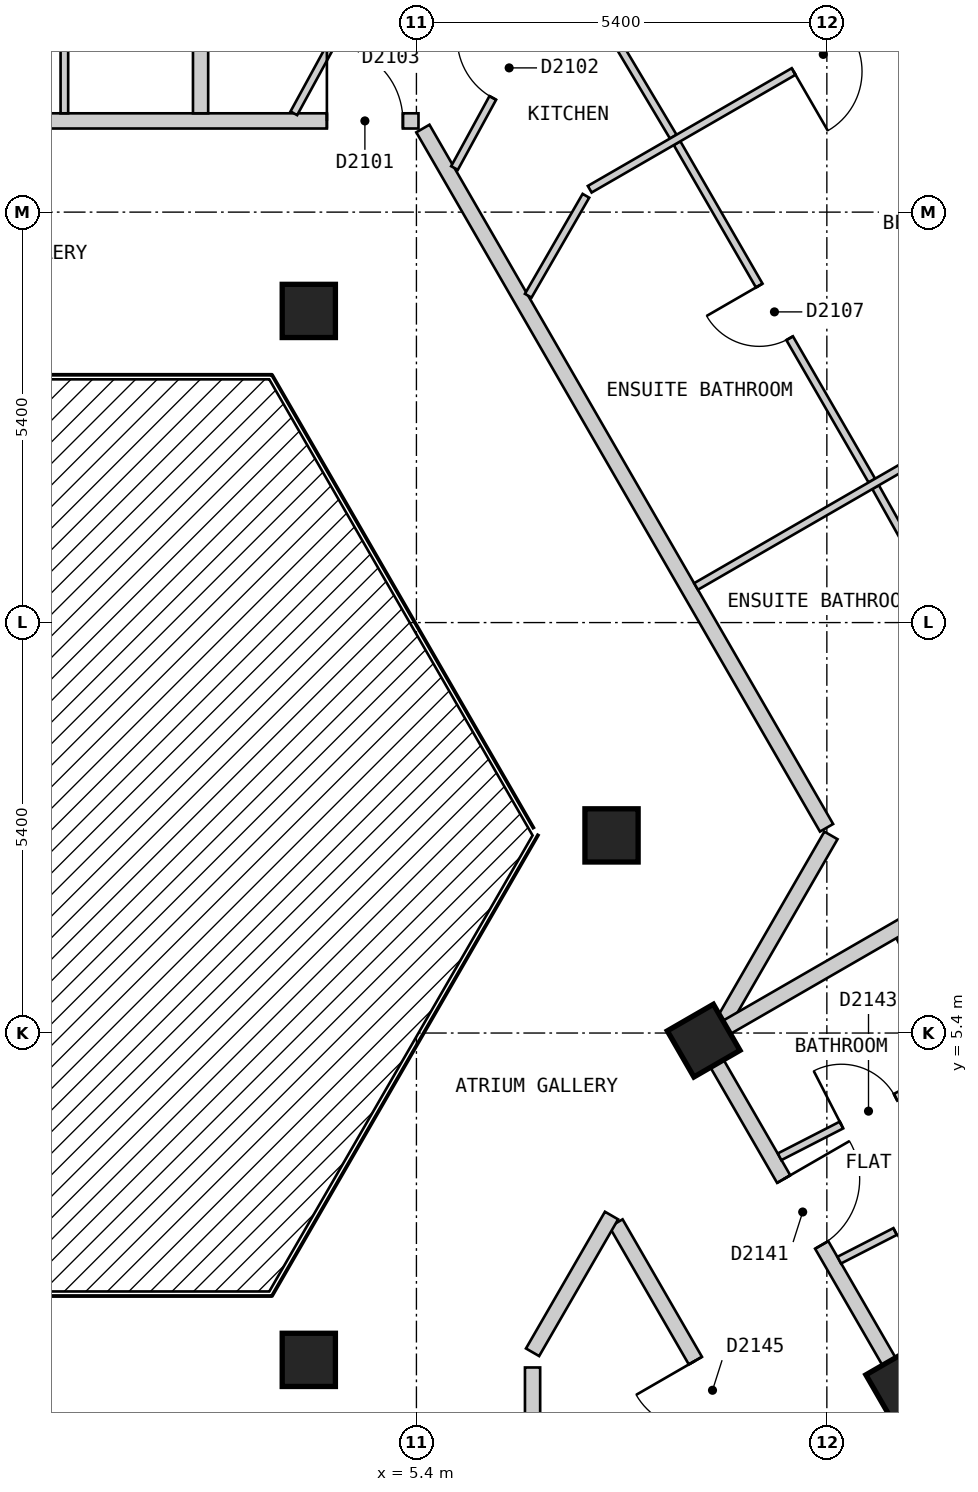
"""IFC4 building model, lengths in metres.
Left out: names, types, materials, properties, quantities, classifications, styles, units other than length and angle.
Written with IfcOpenShell. Run it as: python <this file> out.ifc"""

import sys

from ifc_helpers import new_model, si_unit, direction, frame, frame_2d, origin, origin_2d, place, context, subcontext, project, spatial, rectangle, extrude, element, fill, save


model = new_model("IFC4")
c1 = context("Model", 3, precision=1e-05, world=origin(), true_north=direction((0.0, 1.0)))
c2 = subcontext(c1, "Body", "Model", "MODEL_VIEW")
j1 = project(units=[si_unit("LENGTHUNIT", "METRE"), si_unit("PLANEANGLEUNIT", "RADIAN")], contexts=[c1])
p1 = place(None, origin())
s1 = spatial("IfcSite", under=j1, at=p1, CompositionType="ELEMENT")
p2 = place(p1, origin())
s2 = spatial("IfcBuilding", under=s1, at=p2, CompositionType="ELEMENT")
p3 = place(p2, frame((0.0, 0.0, 217.8)))
s3 = spatial("IfcBuildingStorey", under=s2, at=p3, CompositionType="ELEMENT", Elevation=217.8)
for number, where, z_axis, x_axis in (
    (1, (11.792, 0.775, 0.0), (0.0, 0.0, 1.0), (-0.5, 0.866, 0.0)),
    (2, (3.984, 1.1, 0.0), (0.0, 0.0, 1.0), (1.0, 0.0, 0.0)),
    (3, (9.179, 5.3, 0.0), (0.0, 0.0, 1.0), (-0.5, 0.866, 0.0)),
    (4, (7.967, 8.0, 0.0), (0.0, 0.0, 1.0), (1.0, 0.0, 0.0)),
    (5, (3.984, 14.9, 0.0), (0.0, 0.0, 1.0), (1.0, 0.0, 0.0)),
):
    element("IfcColumn", number, at=place(p3, frame(where, z_axis=z_axis, x_axis=x_axis)), inside=s3, PredefinedType="COLUMN", context=c2, shape_type="SweptSolid", body=[
        extrude(rectangle(XDim=0.7, YDim=0.7, at=origin_2d()), origin(), (0.0, 0.0, 1.0), 3.0),
    ])
p4 = place(p3, frame((8.026, 2.899, 0.0), z_axis=(0.0, 0.0, 1.0), x_axis=(0.499986018985, -0.866033475577, 0.0)))
e6 = element("IfcWall", 6, at=p4, inside=s3, PredefinedType="PARTITIONING", context=c2, shape_type="SweptSolid", body=[
    extrude(rectangle(XDim=5.078, YDim=0.2, at=frame_2d((2.539, 0.0))), origin(), (0.0, 0.0, 1.0), 2.7),
])
p5 = place(p4, frame((2.089, 0.0, 0.0)))
e7 = element("IfcOpeningElement", 7, at=p5, cuts=e6, PredefinedType="OPENING", context=c2, shape_type="SweptSolid", body=[
    extrude(rectangle(XDim=0.9, YDim=2.1, at=frame_2d((0.45, 1.05))), frame((0.0, 0.11, 0.0), z_axis=(0.0, -1.0, 0.0), x_axis=(1.0, 0.0, 0.0)), (0.0, 0.0, 1.0), 0.22),
])
p6 = place(p3, frame((9.238, 5.2, 0.0), z_axis=(0.0, 0.0, 1.0), x_axis=(0.500025705601, -0.86601056214, 0.0)))
e8 = element("IfcWall", 8, at=p6, inside=s3, PredefinedType="PARTITIONING", context=c2, shape_type="SweptSolid", body=[
    extrude(rectangle(XDim=7.735, YDim=0.2, at=frame_2d((3.868, 0.0))), origin(), (0.0, 0.0, 1.0), 2.7),
])
p7 = place(p6, frame((6.705, 0.0, 0.0)))
e9 = element("IfcOpeningElement", 9, at=p7, cuts=e8, PredefinedType="OPENING", context=c2, shape_type="SweptSolid", body=[
    extrude(rectangle(XDim=1.0, YDim=2.1, at=frame_2d((0.5, 1.05))), frame((0.0, 0.11, 0.0), z_axis=(0.0, -1.0, 0.0), x_axis=(1.0, 0.0, 0.0)), (0.0, 0.0, 1.0), 0.22),
])
p8 = place(p6, frame((1.988, 0.0, 0.0)))
e10 = element("IfcOpeningElement", 10, at=p8, cuts=e8, PredefinedType="OPENING", context=c2, shape_type="SweptSolid", body=[
    extrude(rectangle(XDim=1.0, YDim=2.1, at=frame_2d((0.5, 1.05))), frame((0.0, 0.11, 0.0), z_axis=(0.0, -1.0, 0.0), x_axis=(1.0, 0.0, 0.0)), (0.0, 0.0, 1.0), 0.22),
])
p9 = place(p3, frame((5.485, 17.3, 0.0), z_axis=(0.0, 0.0, 1.0), x_axis=(0.499943285704, -0.866058145322, 0.0)))
e11 = element("IfcWall", 11, at=p9, inside=s3, PredefinedType="PARTITIONING", context=c2, shape_type="SweptSolid", body=[
    extrude(rectangle(XDim=10.623, YDim=0.2, at=frame_2d((5.312, 0.0))), origin(), (0.0, 0.0, 1.0), 2.7),
])
p10 = place(p3, frame((6.928, 1.0, 0.0), z_axis=(0.0, 0.0, 1.0), x_axis=(0.0, -1.0, 0.0)))
e12 = element("IfcWall", 12, at=p10, inside=s3, PredefinedType="PARTITIONING", context=c2, shape_type="SweptSolid", body=[
    extrude(rectangle(XDim=3.699, YDim=0.2, at=frame_2d((1.85, 0.0))), origin(), (0.0, 0.0, 1.0), 2.7),
])
p11 = place(p3, frame((-5.312, 17.4, 0.0), z_axis=(0.0, 0.0, 1.0), x_axis=(1.0, 0.0, 0.0)))
e13 = element("IfcWall", 13, at=p11, inside=s3, PredefinedType="PARTITIONING", context=c2, shape_type="SweptSolid", body=[
    extrude(rectangle(XDim=10.739, YDim=0.2, at=frame_2d((5.37, 0.0))), origin(), (0.0, 0.0, 1.0), 2.7),
])
p12 = place(p11, frame((9.534, 0.0, 0.0)))
e14 = element("IfcOpeningElement", 14, at=p12, cuts=e13, PredefinedType="OPENING", context=c2, shape_type="SweptSolid", body=[
    extrude(rectangle(XDim=1.0, YDim=2.1, at=frame_2d((0.5, 1.05))), frame((0.0, 0.11, 0.0), z_axis=(0.0, -1.0, 0.0), x_axis=(1.0, 0.0, 0.0)), (0.0, 0.0, 1.0), 0.22),
])
p13 = place(p11, frame((4.812, 0.0, 0.0)))
e15 = element("IfcOpeningElement", 15, at=p13, cuts=e13, PredefinedType="OPENING", context=c2, shape_type="SweptSolid", body=[
    extrude(rectangle(XDim=1.0, YDim=2.1, at=frame_2d((0.5, 1.05))), frame((0.0, 0.11, 0.0), z_axis=(0.0, -1.0, 0.0), x_axis=(1.0, 0.0, 0.0)), (0.0, 0.0, 1.0), 0.22),
])
p14 = place(p3, frame((6.928, 1.2, 0.0), z_axis=(0.0, 0.0, 1.0), x_axis=(0.500132712588, 0.865948768577, 0.0)))
e16 = element("IfcWall", 16, at=p14, inside=s3, PredefinedType="PARTITIONING", context=c2, shape_type="SweptSolid", body=[
    extrude(rectangle(XDim=2.078, YDim=0.2, at=frame_2d((1.039, 0.0))), origin(), (0.0, 0.0, 1.0), 2.7),
])
p15 = place(p3, frame((9.454, 5.574, 0.0), z_axis=(0.0, 0.0, 1.0), x_axis=(0.499795394297, 0.86614350072, 0.0)))
e17 = element("IfcWall", 17, at=p15, inside=s3, PredefinedType="PARTITIONING", context=c2, shape_type="SweptSolid", body=[
    extrude(rectangle(XDim=2.801, YDim=0.2, at=frame_2d((1.4, 0.0))), origin(), (0.0, 0.0, 1.0), 2.7),
])
p16 = place(p3, frame((7.414, 19.484, 0.0), z_axis=(0.0, 0.0, 1.0), x_axis=(0.511881371655, -0.859056145634, 0.0)))
e18 = element("IfcWall", 18, at=p16, inside=s3, PredefinedType="PARTITIONING", context=c2, shape_type="SweptSolid", body=[
    extrude(rectangle(XDim=2.667, YDim=0.1, at=frame_2d((1.333, 0.0))), origin(), (0.0, 0.0, 1.0), 2.7),
])
p17 = place(p3, frame((8.829, 17.107, 0.0), z_axis=(0.0, 0.0, 1.0), x_axis=(0.500022055211, -0.866012669828, 0.0)))
e19 = element("IfcWall", 19, at=p17, inside=s3, PredefinedType="PARTITIONING", context=c2, shape_type="SweptSolid", body=[
    extrude(rectangle(XDim=5.126, YDim=0.1, at=frame_2d((2.563, 0.0))), origin(), (0.0, 0.0, 1.0), 2.7),
])
p18 = place(p17, frame((2.163, 0.0, 0.0)))
e20 = element("IfcOpeningElement", 20, at=p18, cuts=e19, PredefinedType="OPENING", context=c2, shape_type="SweptSolid", body=[
    extrude(rectangle(XDim=0.8, YDim=2.1, at=frame_2d((0.4, 1.05))), frame((0.0, 0.06, 0.0), z_axis=(0.0, -1.0, 0.0), x_axis=(1.0, 0.0, 0.0)), (0.0, 0.0, 1.0), 0.12),
])
p19 = place(p3, frame((11.441, 12.582, 0.0), z_axis=(0.0, 0.0, 1.0), x_axis=(0.488568218554, -0.872525699231, 0.0)))
e21 = element("IfcWall", 21, at=p19, inside=s3, PredefinedType="PARTITIONING", context=c2, shape_type="SweptSolid", body=[
    extrude(rectangle(XDim=5.076, YDim=0.1, at=frame_2d((2.538, 0.0))), origin(), (0.0, 0.0, 1.0), 2.7),
])
p20 = place(p19, frame((2.163, 0.0, 0.0)))
e22 = element("IfcOpeningElement", 22, at=p20, cuts=e21, PredefinedType="OPENING", context=c2, shape_type="SweptSolid", body=[
    extrude(rectangle(XDim=0.8, YDim=2.1, at=frame_2d((0.4, 1.05))), frame((0.0, 0.06, 0.0), z_axis=(0.0, -1.0, 0.0), x_axis=(1.0, 0.0, 0.0)), (0.0, 0.0, 1.0), 0.12),
])
p21 = place(p3, frame((11.772, 6.646, 0.0), z_axis=(0.0, 0.0, 1.0), x_axis=(0.456175983405, -0.889889584254, 0.0)))
e23 = element("IfcWall", 23, at=p21, inside=s3, PredefinedType="PARTITIONING", context=c2, shape_type="SweptSolid", body=[
    extrude(rectangle(XDim=3.348, YDim=0.1, at=frame_2d((1.674, 0.0))), origin(), (0.0, 0.0, 1.0), 2.7),
])
p22 = place(p3, frame((6.871, 15.1, 0.0), z_axis=(0.0, 0.0, 1.0), x_axis=(0.499805980977, 0.866137391745, 0.0)))
e24 = element("IfcWall", 24, at=p22, inside=s3, PredefinedType="PARTITIONING", context=c2, shape_type="SweptSolid", body=[
    extrude(rectangle(XDim=1.518, YDim=0.1, at=frame_2d((0.759, 0.0))), origin(), (0.0, 0.0, 1.0), 2.7),
])
p23 = place(p3, frame((3.787, 17.5, 0.0), z_axis=(0.0, 0.0, 1.0), x_axis=(0.479146828267, 0.877734764585, 0.0)))
e25 = element("IfcWall", 25, at=p23, inside=s3, PredefinedType="PARTITIONING", context=c2, shape_type="SweptSolid", body=[
    extrude(rectangle(XDim=3.076, YDim=0.1, at=frame_2d((1.538, 0.0))), origin(), (0.0, 0.0, 1.0), 2.7),
])
p24 = place(p23, frame((1.081, 0.0, 0.0)))
e26 = element("IfcOpeningElement", 26, at=p24, cuts=e25, PredefinedType="OPENING", context=c2, shape_type="SweptSolid", body=[
    extrude(rectangle(XDim=0.8, YDim=2.1, at=frame_2d((0.4, 1.05))), frame((0.0, 0.06, 0.0), z_axis=(0.0, -1.0, 0.0), x_axis=(1.0, 0.0, 0.0)), (0.0, 0.0, 1.0), 0.12),
])
p25 = place(p3, frame((5.901, 16.78, 0.0), z_axis=(0.0, 0.0, 1.0), x_axis=(0.479148317257, 0.877733951759, 0.0)))
e27 = element("IfcWall", 27, at=p25, inside=s3, PredefinedType="PARTITIONING", context=c2, shape_type="SweptSolid", body=[
    extrude(rectangle(XDim=3.118, YDim=0.1, at=frame_2d((1.559, 0.0))), origin(), (0.0, 0.0, 1.0), 2.7),
])
p26 = place(p25, frame((1.051, 0.0, 0.0)))
e28 = element("IfcOpeningElement", 28, at=p26, cuts=e27, PredefinedType="OPENING", context=c2, shape_type="SweptSolid", body=[
    extrude(rectangle(XDim=0.9, YDim=2.1, at=frame_2d((0.45, 1.05))), frame((0.0, 0.06, 0.0), z_axis=(0.0, -1.0, 0.0), x_axis=(1.0, 0.0, 0.0)), (0.0, 0.0, 1.0), 0.12),
])
p27 = place(p3, frame((0.768, 17.5, 0.0), z_axis=(0.0, 0.0, 1.0), x_axis=(0.0, 1.0, 0.0)))
e29 = element("IfcWall", 29, at=p27, inside=s3, PredefinedType="PARTITIONING", context=c2, shape_type="SweptSolid", body=[
    extrude(rectangle(XDim=2.51, YDim=0.1, at=frame_2d((1.255, 0.0))), origin(), (0.0, 0.0, 1.0), 2.7),
])
p28 = place(p27, frame((0.83, 0.0, 0.0)))
e30 = element("IfcOpeningElement", 30, at=p28, cuts=e29, PredefinedType="OPENING", context=c2, shape_type="SweptSolid", body=[
    extrude(rectangle(XDim=0.8, YDim=2.1, at=frame_2d((0.4, 1.05))), frame((0.0, 0.06, 0.0), z_axis=(0.0, -1.0, 0.0), x_axis=(1.0, 0.0, 0.0)), (0.0, 0.0, 1.0), 0.12),
])
p29 = place(p3, frame((10.178, 3.772, 0.0), z_axis=(0.0, 0.0, 1.0), x_axis=(0.889732071959, 0.456483121405, 0.0)))
e31 = element("IfcWall", 31, at=p29, inside=s3, PredefinedType="PARTITIONING", context=c2, shape_type="SweptSolid", body=[
    extrude(rectangle(XDim=2.679, YDim=0.1, at=frame_2d((1.34, 0.0))), origin(), (0.0, 0.0, 1.0), 2.7),
])
p30 = place(p29, frame((0.915, 0.0, 0.0)))
e32 = element("IfcOpeningElement", 32, at=p30, cuts=e31, PredefinedType="OPENING", context=c2, shape_type="SweptSolid", body=[
    extrude(rectangle(XDim=0.8, YDim=2.1, at=frame_2d((0.4, 1.05))), frame((0.0, 0.06, 0.0), z_axis=(0.0, -1.0, 0.0), x_axis=(1.0, 0.0, 0.0)), (0.0, 0.0, 1.0), 0.12),
])
p31 = place(p3, frame((10.963, 2.412, 0.0), z_axis=(0.0, 0.0, 1.0), x_axis=(0.889943997558, 0.456069820543, 0.0)))
e33 = element("IfcWall", 33, at=p31, inside=s3, PredefinedType="PARTITIONING", context=c2, shape_type="SweptSolid", body=[
    extrude(rectangle(XDim=2.651, YDim=0.1, at=frame_2d((1.325, 0.0))), origin(), (0.0, 0.0, 1.0), 2.7),
])
p32 = place(p31, frame((0.826, 0.0, 0.0)))
e34 = element("IfcOpeningElement", 34, at=p32, cuts=e33, PredefinedType="OPENING", context=c2, shape_type="SweptSolid", body=[
    extrude(rectangle(XDim=0.9, YDim=2.1, at=frame_2d((0.45, 1.05))), frame((0.0, 0.06, 0.0), z_axis=(0.0, -1.0, 0.0), x_axis=(1.0, 0.0, 0.0)), (0.0, 0.0, 1.0), 0.12),
])
p33 = place(p3, frame((9.079, 11.275, 0.0), z_axis=(0.0, 0.0, 1.0), x_axis=(0.866001485781, 0.500041424909, 0.0)))
e35 = element("IfcWall", 35, at=p33, inside=s3, PredefinedType="PARTITIONING", context=c2, shape_type="SweptSolid", body=[
    extrude(rectangle(XDim=7.2, YDim=0.1, at=frame_2d((3.6, 0.0))), origin(), (0.0, 0.0, 1.0), 2.7),
])
p34 = place(p33, frame((4.5, 0.0, 0.0)))
e36 = element("IfcOpeningElement", 36, at=p34, cuts=e35, PredefinedType="OPENING", context=c2, shape_type="SweptSolid", body=[
    extrude(rectangle(XDim=0.9, YDim=2.1, at=frame_2d((0.45, 1.05))), frame((0.0, 0.06, 0.0), z_axis=(0.0, -1.0, 0.0), x_axis=(1.0, 0.0, 0.0)), (0.0, 0.0, 1.0), 0.12),
])
p35 = place(p3, frame((7.68, 16.501, 0.0), z_axis=(0.0, 0.0, 1.0), x_axis=(0.86602149507, 0.500006770031, 0.0)))
e37 = element("IfcWall", 37, at=p35, inside=s3, PredefinedType="PARTITIONING", context=c2, shape_type="SweptSolid", body=[
    extrude(rectangle(XDim=5.798, YDim=0.1, at=frame_2d((2.899, 0.0))), origin(), (0.0, 0.0, 1.0), 2.7),
])
p36 = place(p35, frame((3.098, 0.0, 0.0)))
e38 = element("IfcOpeningElement", 38, at=p36, cuts=e37, PredefinedType="OPENING", context=c2, shape_type="SweptSolid", body=[
    extrude(rectangle(XDim=0.9, YDim=2.1, at=frame_2d((0.45, 1.05))), frame((0.0, 0.06, 0.0), z_axis=(0.0, -1.0, 0.0), x_axis=(1.0, 0.0, 0.0)), (0.0, 0.0, 1.0), 0.12),
])
p37 = place(p3, frame((2.56, 20.08, 0.0), z_axis=(0.0, 0.0, 1.0), x_axis=(0.0, -1.0, 0.0)))
e39 = element("IfcWall", 39, at=p37, inside=s3, PredefinedType="PARTITIONING", context=c2, shape_type="SweptSolid", body=[
    extrude(rectangle(XDim=2.58, YDim=0.2, at=frame_2d((1.29, 0.0))), origin(), (0.0, 0.0, 1.0), 2.7),
])
p38 = place(p3, frame((9.354, 5.401, 0.0), z_axis=(0.0, 0.0, 1.0), x_axis=(0.866018411306, 0.500012111133, 0.0)))
e40 = element("IfcWall", 40, at=p38, inside=s3, PredefinedType="PARTITIONING", context=c2, shape_type="SweptSolid", body=[
    extrude(rectangle(XDim=9.898, YDim=0.2, at=frame_2d((4.949, 0.0))), origin(), (0.0, 0.0, 1.0), 2.7),
])
p39 = place(p12, origin())
e41 = element("IfcDoor", 41, at=p39, inside=s3, OperationType="SINGLE_SWING_LEFT", PredefinedType="DOOR", context=c2, shape_type="SweptSolid", body=[
    extrude(rectangle(XDim=1.0, YDim=2.1, at=frame_2d((0.5, 1.05))), frame((0.0, 0.025, 0.0), z_axis=(0.0, -1.0, 0.0), x_axis=(1.0, 0.0, 0.0)), (0.0, 0.0, 1.0), 0.05),
])
fill(e14, e41)
p40 = place(p26, origin())
e42 = element("IfcDoor", 42, at=p40, inside=s3, OperationType="SINGLE_SWING_RIGHT", PredefinedType="DOOR", context=c2, shape_type="SweptSolid", body=[
    extrude(rectangle(XDim=0.9, YDim=2.1, at=frame_2d((0.45, 1.05))), frame((0.0, 0.025, 0.0), z_axis=(0.0, -1.0, 0.0), x_axis=(1.0, 0.0, 0.0)), (0.0, 0.0, 1.0), 0.05),
])
fill(e28, e42)
p41 = place(p36, origin())
e43 = element("IfcDoor", 43, at=p41, inside=s3, OperationType="SINGLE_SWING_LEFT", PredefinedType="DOOR", context=c2, shape_type="SweptSolid", body=[
    extrude(rectangle(XDim=0.9, YDim=2.1, at=frame_2d((0.45, 1.05))), frame((0.0, 0.025, 0.0), z_axis=(0.0, -1.0, 0.0), x_axis=(1.0, 0.0, 0.0)), (0.0, 0.0, 1.0), 0.05),
])
fill(e38, e43)
p42 = place(p18, origin())
e44 = element("IfcDoor", 44, at=p42, inside=s3, OperationType="SINGLE_SWING_LEFT", PredefinedType="DOOR", context=c2, shape_type="SweptSolid", body=[
    extrude(rectangle(XDim=0.8, YDim=2.1, at=frame_2d((0.4, 1.05))), frame((0.0, 0.025, 0.0), z_axis=(0.0, -1.0, 0.0), x_axis=(1.0, 0.0, 0.0)), (0.0, 0.0, 1.0), 0.05),
])
fill(e20, e44)
p43 = place(p8, origin())
e45 = element("IfcDoor", 45, at=p43, inside=s3, OperationType="SINGLE_SWING_LEFT", PredefinedType="DOOR", context=c2, shape_type="SweptSolid", body=[
    extrude(rectangle(XDim=1.0, YDim=2.1, at=frame_2d((0.5, 1.05))), frame((0.0, 0.025, 0.0), z_axis=(0.0, -1.0, 0.0), x_axis=(1.0, 0.0, 0.0)), (0.0, 0.0, 1.0), 0.05),
])
fill(e10, e45)
p44 = place(p32, origin())
e46 = element("IfcDoor", 46, at=p44, inside=s3, OperationType="SINGLE_SWING_RIGHT", PredefinedType="DOOR", context=c2, shape_type="SweptSolid", body=[
    extrude(rectangle(XDim=0.9, YDim=2.1, at=frame_2d((0.45, 1.05))), frame((0.0, 0.025, 0.0), z_axis=(0.0, -1.0, 0.0), x_axis=(1.0, 0.0, 0.0)), (0.0, 0.0, 1.0), 0.05),
])
fill(e34, e46)
p45 = place(p30, origin())
e47 = element("IfcDoor", 47, at=p45, inside=s3, OperationType="SINGLE_SWING_LEFT", PredefinedType="DOOR", context=c2, shape_type="SweptSolid", body=[
    extrude(rectangle(XDim=0.8, YDim=2.1, at=frame_2d((0.4, 1.05))), frame((0.0, 0.025, 0.0), z_axis=(0.0, -1.0, 0.0), x_axis=(1.0, 0.0, 0.0)), (0.0, 0.0, 1.0), 0.05),
])
fill(e32, e47)
p46 = place(p5, origin())
e48 = element("IfcDoor", 48, at=p46, inside=s3, OperationType="SINGLE_SWING_LEFT", PredefinedType="DOOR", context=c2, shape_type="SweptSolid", body=[
    extrude(rectangle(XDim=0.9, YDim=2.1, at=frame_2d((0.45, 1.05))), frame((0.0, 0.025, 0.0), z_axis=(0.0, -1.0, 0.0), x_axis=(1.0, 0.0, 0.0)), (0.0, 0.0, 1.0), 0.05),
])
fill(e7, e48)
save(model, sys.argv[1])
